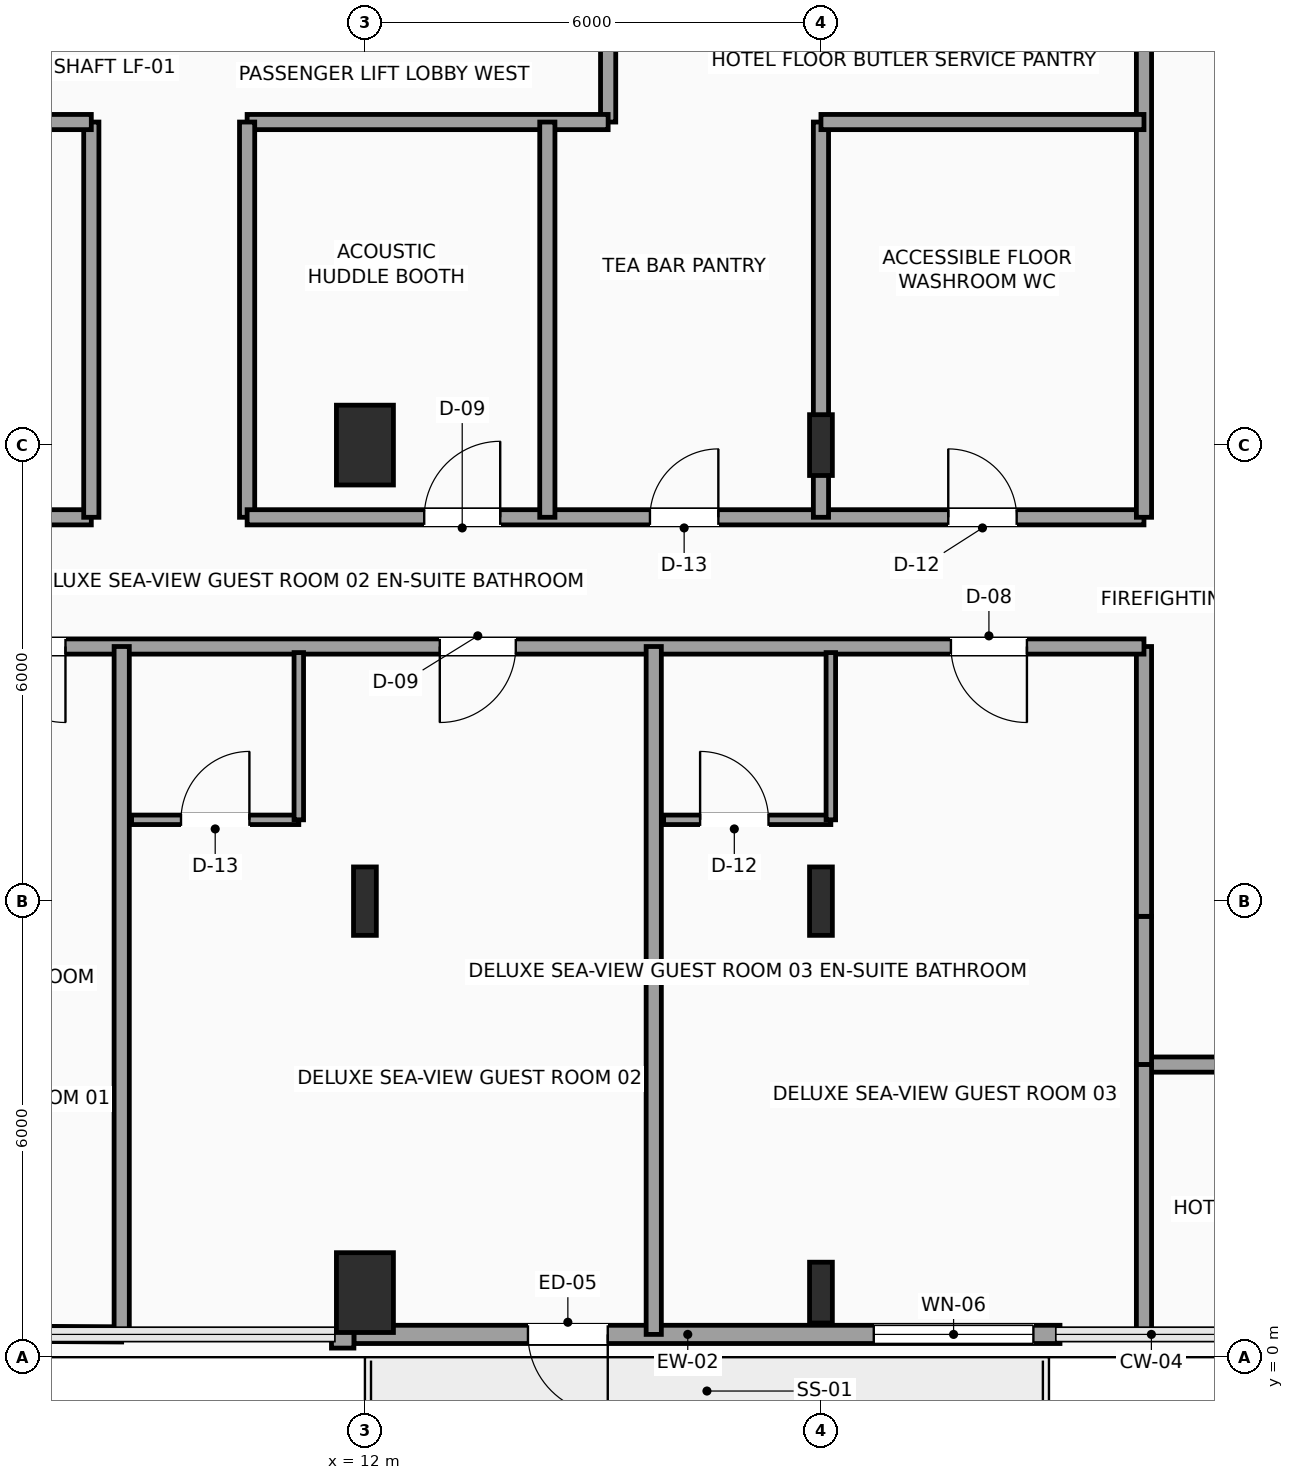
"""IFC4 building model, lengths in metres.
Left out: names, types, materials, properties, quantities, classifications, styles, units other than length and angle.
Written with IfcOpenShell. Run it as: python <this file> out.ifc"""

import sys

from ifc_helpers import new_model, si_unit, direction, frame, frame_2d, origin, origin_2d, place, context, subcontext, project, spatial, rectangle, i_section, extrude, element, fill, save


model = new_model("IFC4")
c1 = context("Model", 3, precision=1e-05, world=origin(), true_north=direction((0.0, 1.0)))
c2 = subcontext(c1, "Body", "Model", "MODEL_VIEW")
j1 = project(units=[si_unit("LENGTHUNIT", "METRE"), si_unit("PLANEANGLEUNIT", "RADIAN")], contexts=[c1])
p1 = place(None, origin())
s1 = spatial("IfcSite", under=j1, at=p1, CompositionType="ELEMENT")
p2 = place(p1, origin())
s2 = spatial("IfcBuilding", under=s1, at=p2, CompositionType="ELEMENT")
p3 = place(p2, frame((0.0, 0.0, 176.7)))
s3 = spatial("IfcBuildingStorey", under=s2, at=p3, CompositionType="ELEMENT", Elevation=176.7)
p4 = place(p3, frame((12.0, 0.85, 0.0), z_axis=(0.0, 0.0, 1.0), x_axis=(1.0, 0.0, 0.0)))
e1 = element("IfcColumn", 1, at=p4, inside=s3, PredefinedType="COLUMN", context=c2, shape_type="SweptSolid", body=[
    extrude(rectangle(XDim=0.75, YDim=1.05, at=origin_2d()), origin(), (0.0, 0.0, 1.0), 3.75),
])
p5 = place(p3, frame((12.0, 6.0, 0.0), z_axis=(0.0, 0.0, 1.0), x_axis=(1.0, 0.0, 0.0)))
e2 = element("IfcColumn", 2, at=p5, inside=s3, PredefinedType="COLUMN", context=c2, shape_type="SweptSolid", body=[
    extrude(i_section(OverallWidth=0.3, OverallDepth=0.9, WebThickness=0.019, FlangeThickness=0.035, FilletRadius=0.03, at=origin_2d()), origin(), (0.0, 0.0, 1.0), 3.75),
])
p6 = place(p3, frame((12.0, 12.0, 0.0), z_axis=(0.0, 0.0, 1.0), x_axis=(1.0, 0.0, 0.0)))
e3 = element("IfcColumn", 3, at=p6, inside=s3, PredefinedType="COLUMN", context=c2, shape_type="SweptSolid", body=[
    extrude(rectangle(XDim=0.75, YDim=1.05, at=origin_2d()), origin(), (0.0, 0.0, 1.0), 3.75),
])
p7 = place(p3, frame((18.0, 0.85, 0.0), z_axis=(0.0, 0.0, 1.0), x_axis=(1.0, 0.0, 0.0)))
e4 = element("IfcColumn", 4, at=p7, inside=s3, PredefinedType="COLUMN", context=c2, shape_type="SweptSolid", body=[
    extrude(i_section(OverallWidth=0.3, OverallDepth=0.8, WebThickness=0.018, FlangeThickness=0.033, FilletRadius=0.03, at=origin_2d()), origin(), (0.0, 0.0, 1.0), 3.75),
])
p8 = place(p3, frame((18.0, 6.0, 0.0), z_axis=(0.0, 0.0, 1.0), x_axis=(1.0, 0.0, 0.0)))
e5 = element("IfcColumn", 5, at=p8, inside=s3, PredefinedType="COLUMN", context=c2, shape_type="SweptSolid", body=[
    extrude(i_section(OverallWidth=0.3, OverallDepth=0.9, WebThickness=0.019, FlangeThickness=0.035, FilletRadius=0.03, at=origin_2d()), origin(), (0.0, 0.0, 1.0), 3.75),
])
p9 = place(p3, frame((18.0, 12.0, 0.0), z_axis=(0.0, 0.0, 1.0), x_axis=(1.0, 0.0, 0.0)))
e6 = element("IfcColumn", 6, at=p9, inside=s3, PredefinedType="COLUMN", context=c2, shape_type="SweptSolid", body=[
    extrude(i_section(OverallWidth=0.3, OverallDepth=0.8, WebThickness=0.018, FlangeThickness=0.033, FilletRadius=0.03, at=origin_2d()), origin(), (0.0, 0.0, 1.0), 3.75),
])
p10 = place(p3, frame((21.145, 0.3, 0.0), z_axis=(0.0, 0.0, 1.0), x_axis=(-1.0, 0.0, 0.0)))
e7 = element("IfcWall", 7, at=p10, inside=s3, PredefinedType="SOLIDWALL", context=c2, shape_type="SweptSolid", body=[
    extrude(rectangle(XDim=9.29, YDim=0.24, at=frame_2d((4.645, 0.0))), origin(), (0.0, 0.0, 1.0), 3.54),
])
p11 = place(p10, frame((5.95, 0.0, 0.0)))
e8 = element("IfcOpeningElement", 8, at=p11, cuts=e7, PredefinedType="OPENING", context=c2, shape_type="SweptSolid", body=[
    extrude(rectangle(XDim=1.05, YDim=2.2, at=frame_2d((0.525, 1.1))), frame((0.0, 0.13, 0.0), z_axis=(0.0, -1.0, 0.0), x_axis=(1.0, 0.0, 0.0)), (0.0, 0.0, 1.0), 0.26),
])
p12 = place(p10, frame((0.35, 0.0, 0.85)))
e9 = element("IfcOpeningElement", 9, at=p12, cuts=e7, PredefinedType="OPENING", context=c2, shape_type="SweptSolid", body=[
    extrude(rectangle(XDim=2.1, YDim=2.2, at=frame_2d((1.05, 1.1))), frame((0.0, 0.13, 0.0), z_axis=(0.0, -1.0, 0.0), x_axis=(1.0, 0.0, 0.0)), (0.0, 0.0, 1.0), 0.26),
])
p13 = place(p3, frame((11.855, 0.24, 0.0), z_axis=(0.0, 0.0, 1.0), x_axis=(-1.0, 0.0, 0.0)))
e10 = element("IfcWall", 10, at=p13, inside=s3, PredefinedType="SOLIDWALL", context=c2, shape_type="SweptSolid", body=[
    extrude(rectangle(XDim=0.295, YDim=0.24, at=frame_2d((0.147, 0.0))), origin(), (0.0, 0.0, 1.0), 3.54),
])
p14 = place(p3, frame((23.95, 3.85, 0.0), z_axis=(0.0, 0.0, 1.0), x_axis=(-1.0, 0.0, 0.0)))
e11 = element("IfcWall", 11, at=p14, inside=s3, PredefinedType="PARTITIONING", context=c2, shape_type="SweptSolid", body=[
    extrude(rectangle(XDim=1.7, YDim=0.2, at=frame_2d((0.85, 0.0))), origin(), (0.0, 0.0, 1.0), 3.54),
])
p15 = place(p3, frame((22.25, 3.85, 0.0), z_axis=(0.0, 0.0, 1.0), x_axis=(0.0, 1.0, 0.0)))
e12 = element("IfcWall", 12, at=p15, inside=s3, PredefinedType="PARTITIONING", context=c2, shape_type="SweptSolid", body=[
    extrude(rectangle(XDim=1.95, YDim=0.2, at=frame_2d((0.975, 0.0))), origin(), (0.0, 0.0, 1.0), 3.54),
])
p16 = place(p3, frame((22.25, 5.8, 0.0), z_axis=(0.0, 0.0, 1.0), x_axis=(0.0, 1.0, 0.0)))
e13 = element("IfcWall", 13, at=p16, inside=s3, PredefinedType="PARTITIONING", context=c2, shape_type="SweptSolid", body=[
    extrude(rectangle(XDim=3.55, YDim=0.2, at=frame_2d((1.775, 0.0))), origin(), (0.0, 0.0, 1.0), 3.54),
])
p17 = place(p3, frame((22.25, 9.35, 0.0), z_axis=(0.0, 0.0, 1.0), x_axis=(-1.0, 0.0, 0.0)))
e14 = element("IfcWall", 14, at=p17, inside=s3, PredefinedType="PARTITIONING", context=c2, shape_type="SweptSolid", body=[
    extrude(rectangle(XDim=15.85, YDim=0.2, at=frame_2d((7.925, 0.0))), origin(), (0.0, 0.0, 1.0), 3.54),
])
p18 = place(p17, frame((14.19, 0.0, 0.0)))
e15 = element("IfcOpeningElement", 15, at=p18, cuts=e14, PredefinedType="OPENING", context=c2, shape_type="SweptSolid", body=[
    extrude(rectangle(XDim=1.0, YDim=2.2, at=frame_2d((0.5, 1.1))), frame((0.0, 0.11, 0.0), z_axis=(0.0, -1.0, 0.0), x_axis=(1.0, 0.0, 0.0)), (0.0, 0.0, 1.0), 0.22),
])
p19 = place(p17, frame((8.265, 0.0, 0.0)))
e16 = element("IfcOpeningElement", 16, at=p19, cuts=e14, PredefinedType="OPENING", context=c2, shape_type="SweptSolid", body=[
    extrude(rectangle(XDim=1.0, YDim=2.2, at=frame_2d((0.5, 1.1))), frame((0.0, 0.11, 0.0), z_axis=(0.0, -1.0, 0.0), x_axis=(1.0, 0.0, 0.0)), (0.0, 0.0, 1.0), 0.22),
])
p20 = place(p17, frame((1.54, 0.0, 0.0)))
e17 = element("IfcOpeningElement", 17, at=p20, cuts=e14, PredefinedType="OPENING", context=c2, shape_type="SweptSolid", body=[
    extrude(rectangle(XDim=1.0, YDim=2.2, at=frame_2d((0.5, 1.1))), frame((0.0, 0.11, 0.0), z_axis=(0.0, -1.0, 0.0), x_axis=(1.0, 0.0, 0.0)), (0.0, 0.0, 1.0), 0.22),
])
p21 = place(p3, frame((6.4, 11.05, 0.0), z_axis=(0.0, 0.0, 1.0), x_axis=(1.0, 0.0, 0.0)))
e18 = element("IfcWall", 18, at=p21, inside=s3, PredefinedType="PARTITIONING", context=c2, shape_type="SweptSolid", body=[
    extrude(rectangle(XDim=2.0, YDim=0.2, at=frame_2d((1.0, 0.0))), origin(), (0.0, 0.0, 1.0), 3.54),
])
p22 = place(p3, frame((8.4, 11.05, 0.0), z_axis=(0.0, 0.0, 1.0), x_axis=(0.0, 1.0, 0.0)))
e19 = element("IfcWall", 19, at=p22, inside=s3, PredefinedType="PARTITIONING", context=c2, shape_type="SweptSolid", body=[
    extrude(rectangle(XDim=5.2, YDim=0.2, at=frame_2d((2.6, 0.0))), origin(), (0.0, 0.0, 1.0), 3.54),
])
p23 = place(p3, frame((8.4, 16.25, 0.0), z_axis=(0.0, 0.0, 1.0), x_axis=(-1.0, 0.0, 0.0)))
e20 = element("IfcWall", 20, at=p23, inside=s3, PredefinedType="PARTITIONING", context=c2, shape_type="SweptSolid", body=[
    extrude(rectangle(XDim=8.1, YDim=0.2, at=frame_2d((4.05, 0.0))), origin(), (0.0, 0.0, 1.0), 3.54),
])
p24 = place(p23, frame((3.525, 0.0, 0.0)))
e21 = element("IfcOpeningElement", 21, at=p24, cuts=e20, PredefinedType="OPENING", context=c2, shape_type="SweptSolid", body=[
    extrude(rectangle(XDim=1.0, YDim=2.2, at=frame_2d((0.5, 1.1))), frame((0.0, 0.11, 0.0), z_axis=(0.0, -1.0, 0.0), x_axis=(1.0, 0.0, 0.0)), (0.0, 0.0, 1.0), 0.22),
])
p25 = place(p3, frame((15.2, 17.95, 0.0), z_axis=(0.0, 0.0, 1.0), x_axis=(0.0, -1.0, 0.0)))
e22 = element("IfcWall", 22, at=p25, inside=s3, PredefinedType="PARTITIONING", context=c2, shape_type="SweptSolid", body=[
    extrude(rectangle(XDim=1.7, YDim=0.2, at=frame_2d((0.85, 0.0))), origin(), (0.0, 0.0, 1.0), 3.54),
])
p26 = place(p3, frame((15.2, 16.25, 0.0), z_axis=(0.0, 0.0, 1.0), x_axis=(-1.0, 0.0, 0.0)))
e23 = element("IfcWall", 23, at=p26, inside=s3, PredefinedType="PARTITIONING", context=c2, shape_type="SweptSolid", body=[
    extrude(rectangle(XDim=4.75, YDim=0.2, at=frame_2d((2.375, 0.0))), origin(), (0.0, 0.0, 1.0), 3.54),
])
p27 = place(p3, frame((10.45, 16.25, 0.0), z_axis=(0.0, 0.0, 1.0), x_axis=(0.0, -1.0, 0.0)))
e24 = element("IfcWall", 24, at=p27, inside=s3, PredefinedType="PARTITIONING", context=c2, shape_type="SweptSolid", body=[
    extrude(rectangle(XDim=5.2, YDim=0.2, at=frame_2d((2.6, 0.0))), origin(), (0.0, 0.0, 1.0), 3.54),
])
p28 = place(p3, frame((10.45, 11.05, 0.0), z_axis=(0.0, 0.0, 1.0), x_axis=(1.0, 0.0, 0.0)))
e25 = element("IfcWall", 25, at=p28, inside=s3, PredefinedType="PARTITIONING", context=c2, shape_type="SweptSolid", body=[
    extrude(rectangle(XDim=11.8, YDim=0.2, at=frame_2d((5.9, 0.0))), origin(), (0.0, 0.0, 1.0), 3.54),
])
p29 = place(p28, frame((2.33, 0.0, 0.0)))
e26 = element("IfcOpeningElement", 26, at=p29, cuts=e25, PredefinedType="OPENING", context=c2, shape_type="SweptSolid", body=[
    extrude(rectangle(XDim=1.0, YDim=2.2, at=frame_2d((0.5, 1.1))), frame((0.0, 0.11, 0.0), z_axis=(0.0, -1.0, 0.0), x_axis=(1.0, 0.0, 0.0)), (0.0, 0.0, 1.0), 0.22),
])
p30 = place(p28, frame((5.3, 0.0, 0.0)))
e27 = element("IfcOpeningElement", 27, at=p30, cuts=e25, PredefinedType="OPENING", context=c2, shape_type="SweptSolid", body=[
    extrude(rectangle(XDim=0.9, YDim=2.1, at=frame_2d((0.45, 1.05))), frame((0.0, 0.11, 0.0), z_axis=(0.0, -1.0, 0.0), x_axis=(1.0, 0.0, 0.0)), (0.0, 0.0, 1.0), 0.22),
])
p31 = place(p28, frame((9.225, 0.0, 0.0)))
e28 = element("IfcOpeningElement", 28, at=p31, cuts=e25, PredefinedType="OPENING", context=c2, shape_type="SweptSolid", body=[
    extrude(rectangle(XDim=0.9, YDim=2.1, at=frame_2d((0.45, 1.05))), frame((0.0, 0.11, 0.0), z_axis=(0.0, -1.0, 0.0), x_axis=(1.0, 0.0, 0.0)), (0.0, 0.0, 1.0), 0.22),
])
p32 = place(p3, frame((22.25, 11.05, 0.0), z_axis=(0.0, 0.0, 1.0), x_axis=(0.0, 1.0, 0.0)))
e29 = element("IfcWall", 29, at=p32, inside=s3, PredefinedType="PARTITIONING", context=c2, shape_type="SweptSolid", body=[
    extrude(rectangle(XDim=19.2, YDim=0.2, at=frame_2d((9.6, 0.0))), origin(), (0.0, 0.0, 1.0), 3.54),
])
p33 = place(p3, frame((14.4, 11.05, 0.0), z_axis=(0.0, 0.0, 1.0), x_axis=(0.0, 1.0, 0.0)))
e30 = element("IfcWall", 30, at=p33, inside=s3, PredefinedType="PARTITIONING", context=c2, shape_type="SweptSolid", body=[
    extrude(rectangle(XDim=5.2, YDim=0.2, at=frame_2d((2.6, 0.0))), origin(), (0.0, 0.0, 1.0), 3.54),
])
p34 = place(p3, frame((18.0, 11.05, 0.0), z_axis=(0.0, 0.0, 1.0), x_axis=(0.0, 1.0, 0.0)))
e31 = element("IfcWall", 31, at=p34, inside=s3, PredefinedType="PARTITIONING", context=c2, shape_type="SweptSolid", body=[
    extrude(rectangle(XDim=5.2, YDim=0.2, at=frame_2d((2.6, 0.0))), origin(), (0.0, 0.0, 1.0), 3.132),
])
p35 = place(p3, frame((18.0, 16.25, 0.0), z_axis=(0.0, 0.0, 1.0), x_axis=(1.0, 0.0, 0.0)))
e32 = element("IfcWall", 32, at=p35, inside=s3, PredefinedType="PARTITIONING", context=c2, shape_type="SweptSolid", body=[
    extrude(rectangle(XDim=4.25, YDim=0.2, at=frame_2d((2.125, 0.0))), origin(), (0.0, 0.0, 1.0), 3.54),
])
p36 = place(p3, frame((22.25, 0.3, 0.0), z_axis=(0.0, 0.0, 1.0), x_axis=(0.0, 1.0, 0.0)))
e33 = element("IfcWall", 33, at=p36, inside=s3, PredefinedType="PARTITIONING", context=c2, shape_type="SweptSolid", body=[
    extrude(rectangle(XDim=3.55, YDim=0.2, at=frame_2d((1.775, 0.0))), origin(), (0.0, 0.0, 1.0), 3.54),
])
p37 = place(p3, frame((0.35, 0.35, 0.0), z_axis=(0.0, 0.0, 1.0), x_axis=(0.99998245966, -0.005922868574, 0.0)))
e34 = element("IfcWall", 34, at=p37, inside=s3, PredefinedType="PARTITIONING", context=c2, shape_type="SweptSolid", body=[
    extrude(rectangle(XDim=8.45, YDim=0.2, at=frame_2d((4.225, 0.0))), origin(), (0.0, 0.0, 1.0), 3.54),
])
for number, where, z_axis, x_axis in (
    (35, (8.8, 0.3, 0.0), (0.0, 0.0, 1.0), (0.0, 1.0, 0.0)),
    (36, (15.8, 0.3, 0.0), (0.0, 0.0, 1.0), (0.0, 1.0, 0.0)),
):
    element("IfcWall", number, at=place(p3, frame(where, z_axis=z_axis, x_axis=x_axis)), inside=s3, PredefinedType="PARTITIONING", context=c2, shape_type="SweptSolid", body=[
        extrude(rectangle(XDim=9.05, YDim=0.2, at=frame_2d((4.525, 0.0))), origin(), (0.0, 0.0, 1.0), 3.54),
    ])
p38 = place(p3, frame((8.93, 7.07, 0.0), z_axis=(0.0, 0.0, 1.0), x_axis=(1.0, 0.0, 0.0)))
e37 = element("IfcWall", 37, at=p38, inside=s3, PredefinedType="PARTITIONING", context=c2, shape_type="SweptSolid", body=[
    extrude(rectangle(XDim=2.2, YDim=0.125, at=frame_2d((1.1, 0.0))), origin(), (0.0, 0.0, 1.0), 3.54),
])
p39 = place(p38, frame((0.65, 0.0, 0.0)))
e38 = element("IfcOpeningElement", 38, at=p39, cuts=e37, PredefinedType="OPENING", context=c2, shape_type="SweptSolid", body=[
    extrude(rectangle(XDim=0.9, YDim=2.1, at=frame_2d((0.45, 1.05))), frame((0.0, 0.073, 0.0), z_axis=(0.0, -1.0, 0.0), x_axis=(1.0, 0.0, 0.0)), (0.0, 0.0, 1.0), 0.145),
])
p40 = place(p3, frame((11.13, 7.07, 0.0), z_axis=(0.0, 0.0, 1.0), x_axis=(0.0, 1.0, 0.0)))
e39 = element("IfcWall", 39, at=p40, inside=s3, PredefinedType="PARTITIONING", context=c2, shape_type="SweptSolid", body=[
    extrude(rectangle(XDim=2.2, YDim=0.125, at=frame_2d((1.1, 0.0))), origin(), (0.0, 0.0, 1.0), 3.54),
])
p41 = place(p3, frame((15.93, 7.07, 0.0), z_axis=(0.0, 0.0, 1.0), x_axis=(1.0, 0.0, 0.0)))
e40 = element("IfcWall", 40, at=p41, inside=s3, PredefinedType="PARTITIONING", context=c2, shape_type="SweptSolid", body=[
    extrude(rectangle(XDim=2.2, YDim=0.125, at=frame_2d((1.1, 0.0))), origin(), (0.0, 0.0, 1.0), 3.54),
])
p42 = place(p41, frame((0.48, 0.0, 0.0)))
e41 = element("IfcOpeningElement", 41, at=p42, cuts=e40, PredefinedType="OPENING", context=c2, shape_type="SweptSolid", body=[
    extrude(rectangle(XDim=0.9, YDim=2.1, at=frame_2d((0.45, 1.05))), frame((0.0, 0.073, 0.0), z_axis=(0.0, -1.0, 0.0), x_axis=(1.0, 0.0, 0.0)), (0.0, 0.0, 1.0), 0.145),
])
p43 = place(p3, frame((18.13, 7.07, 0.0), z_axis=(0.0, 0.0, 1.0), x_axis=(0.0, 1.0, 0.0)))
e42 = element("IfcWall", 42, at=p43, inside=s3, PredefinedType="PARTITIONING", context=c2, shape_type="SweptSolid", body=[
    extrude(rectangle(XDim=2.2, YDim=0.125, at=frame_2d((1.1, 0.0))), origin(), (0.0, 0.0, 1.0), 3.132),
])
p44 = place(p11, origin())
e43 = element("IfcDoor", 43, at=p44, inside=s3, OperationType="SINGLE_SWING_LEFT", PredefinedType="DOOR", context=c2, shape_type="SweptSolid", body=[
    extrude(rectangle(XDim=1.05, YDim=2.2, at=frame_2d((0.525, 1.1))), frame((0.0, 0.025, 0.0), z_axis=(0.0, -1.0, 0.0), x_axis=(1.0, 0.0, 0.0)), (0.0, 0.0, 1.0), 0.05),
])
fill(e8, e43)
p45 = place(p12, origin())
e44 = element("IfcWindow", 44, at=p45, inside=s3, PartitioningType="SINGLE_PANEL", PredefinedType="WINDOW", context=c2, shape_type="SweptSolid", body=[
    extrude(rectangle(XDim=2.1, YDim=2.2, at=frame_2d((1.05, 1.1))), frame((0.0, 0.03, 0.0), z_axis=(0.0, -1.0, 0.0), x_axis=(1.0, 0.0, 0.0)), (0.0, 0.0, 1.0), 0.06),
])
fill(e9, e44)
p46 = place(p18, origin())
e45 = element("IfcDoor", 45, at=p46, inside=s3, OperationType="SINGLE_SWING_LEFT", PredefinedType="DOOR", context=c2, shape_type="SweptSolid", body=[
    extrude(rectangle(XDim=1.0, YDim=2.2, at=frame_2d((0.5, 1.1))), frame((0.0, 0.025, 0.0), z_axis=(0.0, -1.0, 0.0), x_axis=(1.0, 0.0, 0.0)), (0.0, 0.0, 1.0), 0.05),
])
fill(e15, e45)
p47 = place(p19, origin())
e46 = element("IfcDoor", 46, at=p47, inside=s3, OperationType="SINGLE_SWING_RIGHT", PredefinedType="DOOR", context=c2, shape_type="SweptSolid", body=[
    extrude(rectangle(XDim=1.0, YDim=2.2, at=frame_2d((0.5, 1.1))), frame((0.0, 0.025, 0.0), z_axis=(0.0, -1.0, 0.0), x_axis=(1.0, 0.0, 0.0)), (0.0, 0.0, 1.0), 0.05),
])
fill(e16, e46)
p48 = place(p20, origin())
e47 = element("IfcDoor", 47, at=p48, inside=s3, OperationType="SINGLE_SWING_LEFT", PredefinedType="DOOR", context=c2, shape_type="SweptSolid", body=[
    extrude(rectangle(XDim=1.0, YDim=2.2, at=frame_2d((0.5, 1.1))), frame((0.0, 0.025, 0.0), z_axis=(0.0, -1.0, 0.0), x_axis=(1.0, 0.0, 0.0)), (0.0, 0.0, 1.0), 0.05),
])
fill(e17, e47)
p49 = place(p29, origin())
e48 = element("IfcDoor", 48, at=p49, inside=s3, OperationType="SINGLE_SWING_RIGHT", PredefinedType="DOOR", context=c2, shape_type="SweptSolid", body=[
    extrude(rectangle(XDim=1.0, YDim=2.2, at=frame_2d((0.5, 1.1))), frame((0.0, 0.025, 0.0), z_axis=(0.0, -1.0, 0.0), x_axis=(1.0, 0.0, 0.0)), (0.0, 0.0, 1.0), 0.05),
])
fill(e26, e48)
p50 = place(p30, origin())
e49 = element("IfcDoor", 49, at=p50, inside=s3, OperationType="SINGLE_SWING_RIGHT", PredefinedType="DOOR", context=c2, shape_type="SweptSolid", body=[
    extrude(rectangle(XDim=0.9, YDim=2.1, at=frame_2d((0.45, 1.05))), frame((0.0, 0.025, 0.0), z_axis=(0.0, -1.0, 0.0), x_axis=(1.0, 0.0, 0.0)), (0.0, 0.0, 1.0), 0.05),
])
fill(e27, e49)
p51 = place(p31, origin())
e50 = element("IfcDoor", 50, at=p51, inside=s3, OperationType="SINGLE_SWING_LEFT", PredefinedType="DOOR", context=c2, shape_type="SweptSolid", body=[
    extrude(rectangle(XDim=0.9, YDim=2.1, at=frame_2d((0.45, 1.05))), frame((0.0, 0.025, 0.0), z_axis=(0.0, -1.0, 0.0), x_axis=(1.0, 0.0, 0.0)), (0.0, 0.0, 1.0), 0.05),
])
fill(e28, e50)
p52 = place(p39, origin())
e51 = element("IfcDoor", 51, at=p52, inside=s3, OperationType="SINGLE_SWING_RIGHT", PredefinedType="DOOR", context=c2, shape_type="SweptSolid", body=[
    extrude(rectangle(XDim=0.9, YDim=2.1, at=frame_2d((0.45, 1.05))), frame((0.0, 0.025, 0.0), z_axis=(0.0, -1.0, 0.0), x_axis=(1.0, 0.0, 0.0)), (0.0, 0.0, 1.0), 0.05),
])
fill(e38, e51)
p53 = place(p42, origin())
e52 = element("IfcDoor", 52, at=p53, inside=s3, OperationType="SINGLE_SWING_LEFT", PredefinedType="DOOR", context=c2, shape_type="SweptSolid", body=[
    extrude(rectangle(XDim=0.9, YDim=2.1, at=frame_2d((0.45, 1.05))), frame((0.0, 0.025, 0.0), z_axis=(0.0, -1.0, 0.0), x_axis=(1.0, 0.0, 0.0)), (0.0, 0.0, 1.0), 0.05),
])
fill(e41, e52)
save(model, sys.argv[1])
